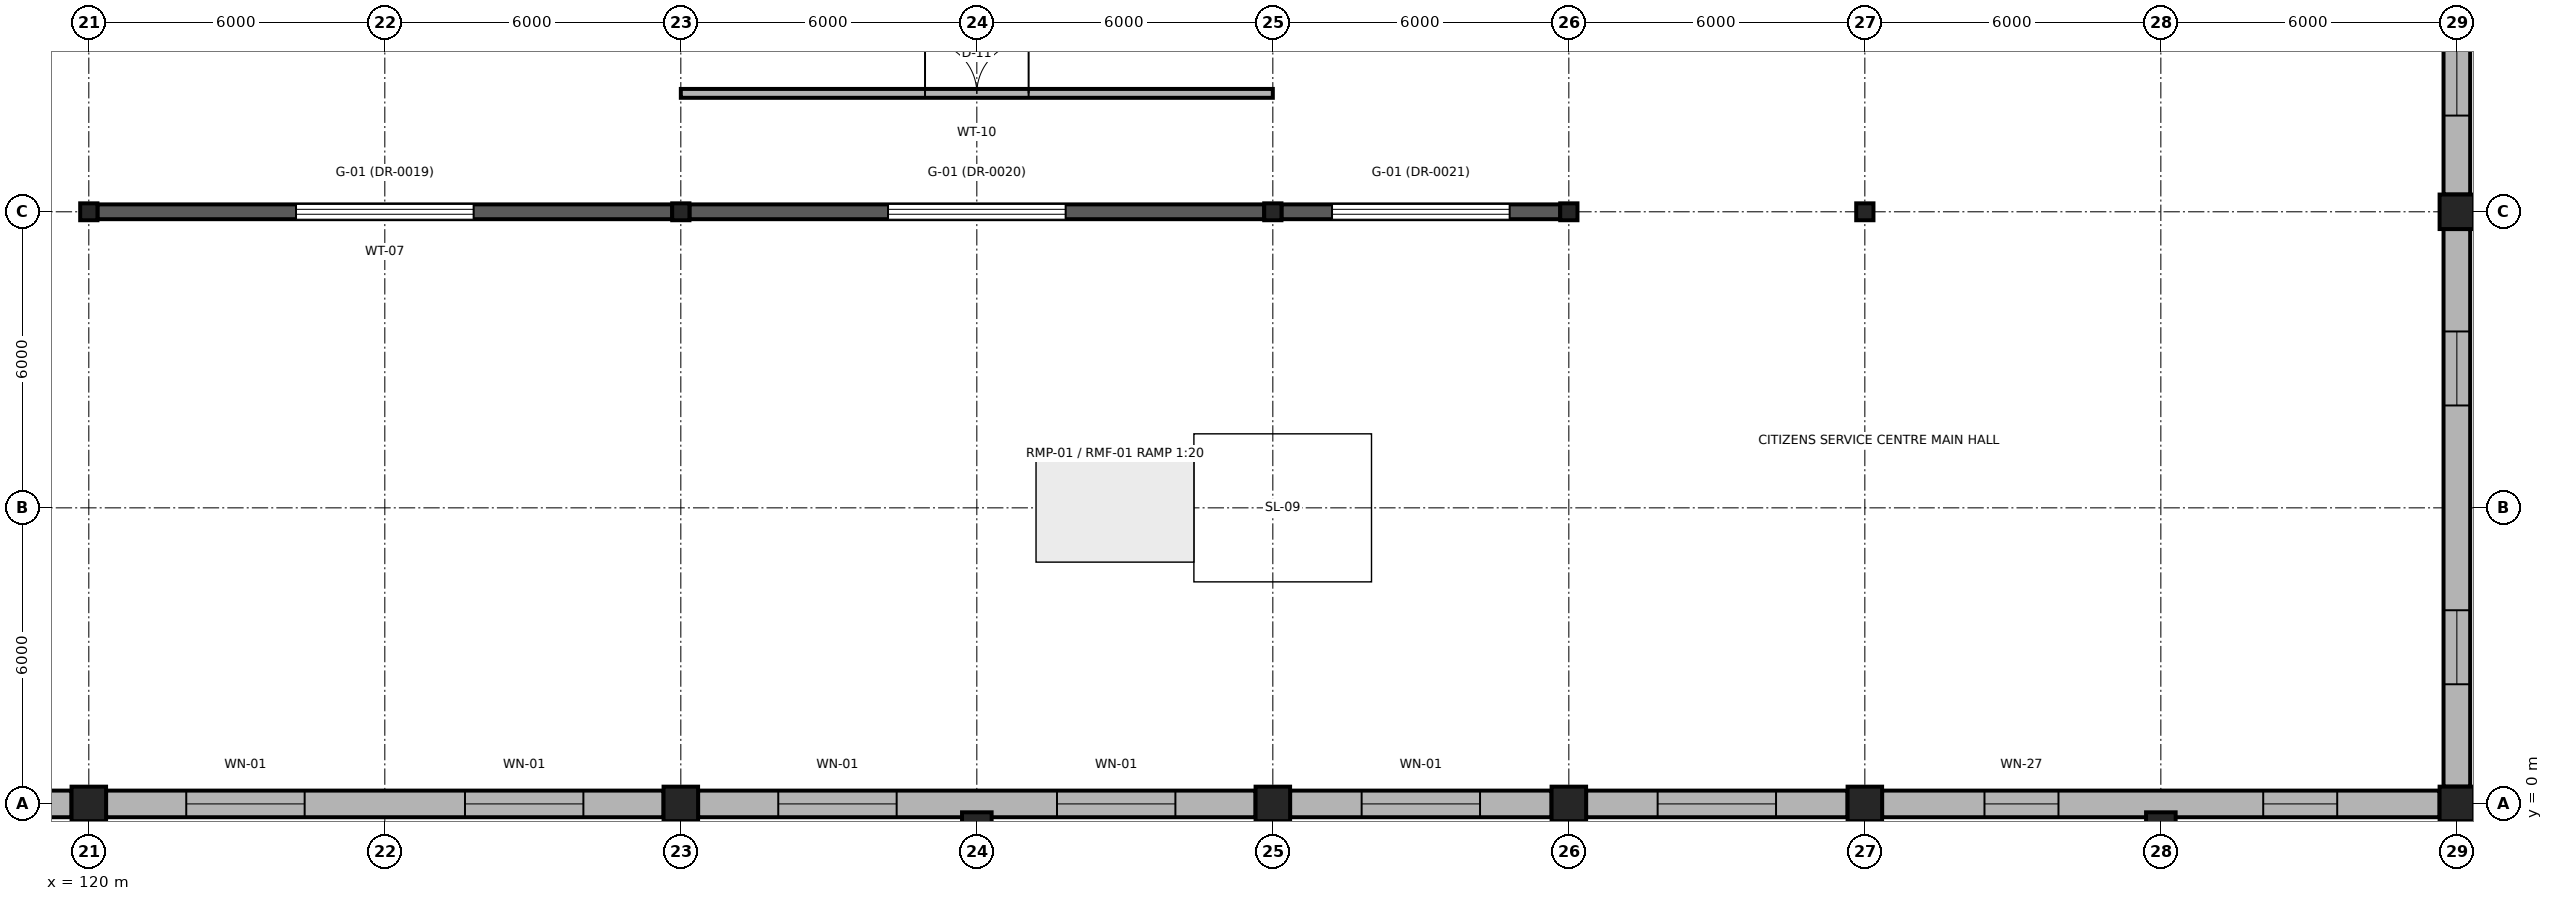
"""IFC4 building model, lengths in metres.
Left out: names, types, materials, properties, quantities, classifications, styles, units other than length and angle.
Written with IfcOpenShell. Run it as: python <this file> out.ifc"""

import sys

from ifc_helpers import new_model, si_unit, direction, frame, frame_2d, origin, origin_2d, place, context, subcontext, project, spatial, rectangle, i_section, extrude, element, fill, save


model = new_model("IFC4")
c1 = context("Model", 3, precision=1e-05, world=origin(), true_north=direction((0.0, 1.0)))
c2 = subcontext(c1, "Body", "Model", "MODEL_VIEW")
j1 = project(units=[si_unit("LENGTHUNIT", "METRE"), si_unit("PLANEANGLEUNIT", "RADIAN")], contexts=[c1])
p1 = place(None, origin())
s1 = spatial("IfcSite", under=j1, at=p1, CompositionType="ELEMENT")
p2 = place(p1, origin())
s2 = spatial("IfcBuilding", under=s1, at=p2, CompositionType="ELEMENT")
p3 = place(p2, origin())
s3 = spatial("IfcBuildingStorey", under=s2, at=p3, CompositionType="ELEMENT", Elevation=0.0)
for number, where, z_axis, x_axis in (
    (1, (120.0, 0.0, 0.0), (0.0, 0.0, 1.0), (1.0, 0.0, 0.0)),
    (2, (132.0, 0.0, 0.0), (0.0, 0.0, 1.0), (1.0, 0.0, 0.0)),
    (3, (144.0, 0.0, 0.0), (0.0, 0.0, 1.0), (1.0, 0.0, 0.0)),
    (4, (150.0, 0.0, 0.0), (0.0, 0.0, 1.0), (1.0, 0.0, 0.0)),
    (5, (156.0, 0.0, 0.0), (0.0, 0.0, 1.0), (1.0, 0.0, 0.0)),
    (6, (168.0, 0.0, 0.0), (0.0, 0.0, 1.0), (1.0, 0.0, 0.0)),
):
    element("IfcColumn", number, at=place(p3, frame(where, z_axis=z_axis, x_axis=x_axis)), inside=s3, PredefinedType="COLUMN", context=c2, shape_type="SweptSolid", body=[
        extrude(rectangle(XDim=0.7, YDim=0.7, at=origin_2d()), origin(), (0.0, 0.0, 1.0), 6.0),
    ])
for number, where, z_axis, x_axis in (
    (7, (120.0, 12.0, 0.0), (0.0, 0.0, 1.0), (1.0, 0.0, 0.0)),
    (8, (132.0, 12.0, 0.0), (0.0, 0.0, 1.0), (1.0, 0.0, 0.0)),
    (9, (144.0, 12.0, 0.0), (0.0, 0.0, 1.0), (1.0, 0.0, 0.0)),
    (10, (150.0, 12.0, 0.0), (0.0, 0.0, 1.0), (1.0, 0.0, 0.0)),
    (11, (156.0, 12.0, 0.0), (0.0, 0.0, 1.0), (1.0, 0.0, 0.0)),
):
    element("IfcColumn", number, at=place(p3, frame(where, z_axis=z_axis, x_axis=x_axis)), inside=s3, PredefinedType="COLUMN", context=c2, shape_type="SweptSolid", body=[
        extrude(i_section(OverallWidth=0.35, OverallDepth=0.343, WebThickness=0.01, FlangeThickness=0.015, FilletRadius=0.02, at=origin_2d()), origin(), (0.0, 0.0, 1.0), 6.0),
    ])
p4 = place(p3, frame((168.0, 12.0, 0.0), z_axis=(0.0, 0.0, 1.0), x_axis=(1.0, 0.0, 0.0)))
e12 = element("IfcColumn", 12, at=p4, inside=s3, PredefinedType="COLUMN", context=c2, shape_type="SweptSolid", body=[
    extrude(rectangle(XDim=0.7, YDim=0.7, at=origin_2d()), origin(), (0.0, 0.0, 1.0), 6.0),
])
for number, where, z_axis, x_axis in (
    (13, (138.0, -0.35, 0.0), (0.0, 0.0, 1.0), (1.0, 0.0, 0.0)),
    (14, (162.0, -0.35, 0.0), (0.0, 0.0, 1.0), (1.0, 0.0, 0.0)),
):
    element("IfcColumn", number, at=place(p3, frame(where, z_axis=z_axis, x_axis=x_axis)), inside=s3, PredefinedType="PILASTER", context=c2, shape_type="SweptSolid", body=[
        extrude(rectangle(XDim=0.6, YDim=0.36, at=origin_2d()), origin(), (0.0, 0.0, 1.0), 6.0),
    ])
p5 = place(p3, frame((114.35, 0.0, 0.0), z_axis=(0.0, 0.0, 1.0), x_axis=(1.0, 0.0, 0.0)))
e15 = element("IfcWall", 15, at=p5, inside=s3, PredefinedType="SOLIDWALL", context=c2, shape_type="SweptSolid", body=[
    extrude(rectangle(XDim=5.3, YDim=0.54, at=frame_2d((2.65, 0.0))), origin(), (0.0, 0.0, 1.0), 5.31),
])
p6 = place(p5, frame((1.45, 0.0, 0.85)))
e16 = element("IfcOpeningElement", 16, at=p6, cuts=e15, PredefinedType="OPENING", context=c2, shape_type="SweptSolid", body=[
    extrude(rectangle(XDim=2.4, YDim=3.6, at=frame_2d((1.2, 1.8))), frame((0.0, 0.285, 0.0), z_axis=(0.0, -1.0, 0.0), x_axis=(1.0, 0.0, 0.0)), (0.0, 0.0, 1.0), 0.57),
])
p7 = place(p3, frame((120.35, 0.0, 0.0), z_axis=(0.0, 0.0, 1.0), x_axis=(1.0, 0.0, 0.0)))
e17 = element("IfcWall", 17, at=p7, inside=s3, PredefinedType="SOLIDWALL", context=c2, shape_type="SweptSolid", body=[
    extrude(rectangle(XDim=11.3, YDim=0.54, at=frame_2d((5.65, 0.0))), origin(), (0.0, 0.0, 1.0), 5.31),
])
p8 = place(p7, frame((1.625, 0.0, 0.85)))
e18 = element("IfcOpeningElement", 18, at=p8, cuts=e17, PredefinedType="OPENING", context=c2, shape_type="SweptSolid", body=[
    extrude(rectangle(XDim=2.4, YDim=3.6, at=frame_2d((1.2, 1.8))), frame((0.0, 0.285, 0.0), z_axis=(0.0, -1.0, 0.0), x_axis=(1.0, 0.0, 0.0)), (0.0, 0.0, 1.0), 0.57),
])
p9 = place(p7, frame((7.275, 0.0, 0.85)))
e19 = element("IfcOpeningElement", 19, at=p9, cuts=e17, PredefinedType="OPENING", context=c2, shape_type="SweptSolid", body=[
    extrude(rectangle(XDim=2.4, YDim=3.6, at=frame_2d((1.2, 1.8))), frame((0.0, 0.285, 0.0), z_axis=(0.0, -1.0, 0.0), x_axis=(1.0, 0.0, 0.0)), (0.0, 0.0, 1.0), 0.57),
])
p10 = place(p3, frame((132.35, 0.0, 0.0), z_axis=(0.0, 0.0, 1.0), x_axis=(1.0, 0.0, 0.0)))
e20 = element("IfcWall", 20, at=p10, inside=s3, PredefinedType="SOLIDWALL", context=c2, shape_type="SweptSolid", body=[
    extrude(rectangle(XDim=11.3, YDim=0.54, at=frame_2d((5.65, 0.0))), origin(), (0.0, 0.0, 1.0), 5.31),
])
p11 = place(p10, frame((1.625, 0.0, 0.85)))
e21 = element("IfcOpeningElement", 21, at=p11, cuts=e20, PredefinedType="OPENING", context=c2, shape_type="SweptSolid", body=[
    extrude(rectangle(XDim=2.4, YDim=3.6, at=frame_2d((1.2, 1.8))), frame((0.0, 0.285, 0.0), z_axis=(0.0, -1.0, 0.0), x_axis=(1.0, 0.0, 0.0)), (0.0, 0.0, 1.0), 0.57),
])
p12 = place(p10, frame((7.275, 0.0, 0.85)))
e22 = element("IfcOpeningElement", 22, at=p12, cuts=e20, PredefinedType="OPENING", context=c2, shape_type="SweptSolid", body=[
    extrude(rectangle(XDim=2.4, YDim=3.6, at=frame_2d((1.2, 1.8))), frame((0.0, 0.285, 0.0), z_axis=(0.0, -1.0, 0.0), x_axis=(1.0, 0.0, 0.0)), (0.0, 0.0, 1.0), 0.57),
])
p13 = place(p3, frame((144.35, 0.0, 0.0), z_axis=(0.0, 0.0, 1.0), x_axis=(1.0, 0.0, 0.0)))
e23 = element("IfcWall", 23, at=p13, inside=s3, PredefinedType="SOLIDWALL", context=c2, shape_type="SweptSolid", body=[
    extrude(rectangle(XDim=5.3, YDim=0.54, at=frame_2d((2.65, 0.0))), origin(), (0.0, 0.0, 1.0), 5.31),
])
p14 = place(p13, frame((1.45, 0.0, 0.85)))
e24 = element("IfcOpeningElement", 24, at=p14, cuts=e23, PredefinedType="OPENING", context=c2, shape_type="SweptSolid", body=[
    extrude(rectangle(XDim=2.4, YDim=3.6, at=frame_2d((1.2, 1.8))), frame((0.0, 0.285, 0.0), z_axis=(0.0, -1.0, 0.0), x_axis=(1.0, 0.0, 0.0)), (0.0, 0.0, 1.0), 0.57),
])
p15 = place(p3, frame((150.35, 0.0, 0.0), z_axis=(0.0, 0.0, 1.0), x_axis=(1.0, 0.0, 0.0)))
e25 = element("IfcWall", 25, at=p15, inside=s3, PredefinedType="SOLIDWALL", context=c2, shape_type="SweptSolid", body=[
    extrude(rectangle(XDim=5.3, YDim=0.54, at=frame_2d((2.65, 0.0))), origin(), (0.0, 0.0, 1.0), 5.31),
])
p16 = place(p15, frame((1.45, 0.0, 0.85)))
e26 = element("IfcOpeningElement", 26, at=p16, cuts=e25, PredefinedType="OPENING", context=c2, shape_type="SweptSolid", body=[
    extrude(rectangle(XDim=2.4, YDim=3.6, at=frame_2d((1.2, 1.8))), frame((0.0, 0.285, 0.0), z_axis=(0.0, -1.0, 0.0), x_axis=(1.0, 0.0, 0.0)), (0.0, 0.0, 1.0), 0.57),
])
p17 = place(p3, frame((156.35, 0.0, 0.0), z_axis=(0.0, 0.0, 1.0), x_axis=(1.0, 0.0, 0.0)))
e27 = element("IfcWall", 27, at=p17, inside=s3, PredefinedType="SOLIDWALL", context=c2, shape_type="SweptSolid", body=[
    extrude(rectangle(XDim=11.3, YDim=0.54, at=frame_2d((5.65, 0.0))), origin(), (0.0, 0.0, 1.0), 5.31),
])
p18 = place(p17, frame((2.075, 0.0, 0.85)))
e28 = element("IfcOpeningElement", 28, at=p18, cuts=e27, PredefinedType="OPENING", context=c2, shape_type="SweptSolid", body=[
    extrude(rectangle(XDim=1.5, YDim=2.8, at=frame_2d((0.75, 1.4))), frame((0.0, 0.285, 0.0), z_axis=(0.0, -1.0, 0.0), x_axis=(1.0, 0.0, 0.0)), (0.0, 0.0, 1.0), 0.57),
])
p19 = place(p17, frame((7.725, 0.0, 0.85)))
e29 = element("IfcOpeningElement", 29, at=p19, cuts=e27, PredefinedType="OPENING", context=c2, shape_type="SweptSolid", body=[
    extrude(rectangle(XDim=1.5, YDim=2.8, at=frame_2d((0.75, 1.4))), frame((0.0, 0.285, 0.0), z_axis=(0.0, -1.0, 0.0), x_axis=(1.0, 0.0, 0.0)), (0.0, 0.0, 1.0), 0.57),
])
p20 = place(p3, frame((120.175, 12.0, 0.0), z_axis=(0.0, 0.0, 1.0), x_axis=(1.0, 0.0, 0.0)))
e30 = element("IfcWall", 30, at=p20, inside=s3, PredefinedType="SHEAR", context=c2, shape_type="SweptSolid", body=[
    extrude(rectangle(XDim=11.65, YDim=0.3, at=frame_2d((5.825, 0.0))), origin(), (0.0, 0.0, 1.0), 5.31),
])
p21 = place(p20, frame((4.025, 0.0, 0.0)))
e31 = element("IfcOpeningElement", 31, at=p21, cuts=e30, PredefinedType="OPENING", context=c2, shape_type="SweptSolid", body=[
    extrude(rectangle(XDim=3.6, YDim=3.4, at=frame_2d((1.8, 1.7))), frame((0.0, 0.165, 0.0), z_axis=(0.0, -1.0, 0.0), x_axis=(1.0, 0.0, 0.0)), (0.0, 0.0, 1.0), 0.33),
])
p22 = place(p3, frame((132.175, 12.0, 0.0), z_axis=(0.0, 0.0, 1.0), x_axis=(1.0, 0.0, 0.0)))
e32 = element("IfcWall", 32, at=p22, inside=s3, PredefinedType="SHEAR", context=c2, shape_type="SweptSolid", body=[
    extrude(rectangle(XDim=11.65, YDim=0.3, at=frame_2d((5.825, 0.0))), origin(), (0.0, 0.0, 1.0), 5.31),
])
p23 = place(p22, frame((4.025, 0.0, 0.0)))
e33 = element("IfcOpeningElement", 33, at=p23, cuts=e32, PredefinedType="OPENING", context=c2, shape_type="SweptSolid", body=[
    extrude(rectangle(XDim=3.6, YDim=3.4, at=frame_2d((1.8, 1.7))), frame((0.0, 0.165, 0.0), z_axis=(0.0, -1.0, 0.0), x_axis=(1.0, 0.0, 0.0)), (0.0, 0.0, 1.0), 0.33),
])
p24 = place(p3, frame((144.175, 12.0, 0.0), z_axis=(0.0, 0.0, 1.0), x_axis=(1.0, 0.0, 0.0)))
e34 = element("IfcWall", 34, at=p24, inside=s3, PredefinedType="SHEAR", context=c2, shape_type="SweptSolid", body=[
    extrude(rectangle(XDim=5.65, YDim=0.3, at=frame_2d((2.825, 0.0))), origin(), (0.0, 0.0, 1.0), 5.31),
])
p25 = place(p24, frame((1.025, 0.0, 0.0)))
e35 = element("IfcOpeningElement", 35, at=p25, cuts=e34, PredefinedType="OPENING", context=c2, shape_type="SweptSolid", body=[
    extrude(rectangle(XDim=3.6, YDim=3.4, at=frame_2d((1.8, 1.7))), frame((0.0, 0.165, 0.0), z_axis=(0.0, -1.0, 0.0), x_axis=(1.0, 0.0, 0.0)), (0.0, 0.0, 1.0), 0.33),
])
p26 = place(p3, frame((168.0, 0.35, 0.0), z_axis=(0.0, 0.0, 1.0), x_axis=(0.0, 1.0, 0.0)))
e36 = element("IfcWall", 36, at=p26, inside=s3, PredefinedType="SOLIDWALL", context=c2, shape_type="SweptSolid", body=[
    extrude(rectangle(XDim=11.3, YDim=0.54, at=frame_2d((5.65, 0.0))), origin(), (0.0, 0.0, 1.0), 5.31),
])
p27 = place(p26, frame((2.075, 0.0, 0.85)))
e37 = element("IfcOpeningElement", 37, at=p27, cuts=e36, PredefinedType="OPENING", context=c2, shape_type="SweptSolid", body=[
    extrude(rectangle(XDim=1.5, YDim=2.8, at=frame_2d((0.75, 1.4))), frame((0.0, 0.285, 0.0), z_axis=(0.0, -1.0, 0.0), x_axis=(1.0, 0.0, 0.0)), (0.0, 0.0, 1.0), 0.57),
])
p28 = place(p26, frame((7.725, 0.0, 0.85)))
e38 = element("IfcOpeningElement", 38, at=p28, cuts=e36, PredefinedType="OPENING", context=c2, shape_type="SweptSolid", body=[
    extrude(rectangle(XDim=1.5, YDim=2.8, at=frame_2d((0.75, 1.4))), frame((0.0, 0.285, 0.0), z_axis=(0.0, -1.0, 0.0), x_axis=(1.0, 0.0, 0.0)), (0.0, 0.0, 1.0), 0.57),
])
p29 = place(p3, frame((168.0, 12.35, 0.0), z_axis=(0.0, 0.0, 1.0), x_axis=(0.0, 1.0, 0.0)))
e39 = element("IfcWall", 39, at=p29, inside=s3, PredefinedType="SOLIDWALL", context=c2, shape_type="SweptSolid", body=[
    extrude(rectangle(XDim=5.3, YDim=0.54, at=frame_2d((2.65, 0.0))), origin(), (0.0, 0.0, 1.0), 5.31),
])
p30 = place(p29, frame((1.6, 0.0, 0.85)))
e40 = element("IfcOpeningElement", 40, at=p30, cuts=e39, PredefinedType="OPENING", context=c2, shape_type="SweptSolid", body=[
    extrude(rectangle(XDim=2.1, YDim=3.4, at=frame_2d((1.05, 1.7))), frame((0.0, 0.285, 0.0), z_axis=(0.0, -1.0, 0.0), x_axis=(1.0, 0.0, 0.0)), (0.0, 0.0, 1.0), 0.57),
])
p31 = place(p3, frame((132.0, 14.4, 0.0), z_axis=(0.0, 0.0, 1.0), x_axis=(1.0, 0.0, 0.0)))
e41 = element("IfcWall", 41, at=p31, inside=s3, PredefinedType="PARTITIONING", context=c2, shape_type="SweptSolid", body=[
    extrude(rectangle(XDim=12.0, YDim=0.18, at=frame_2d((6.0, 0.0))), origin(), (0.0, 0.0, 1.0), 5.76),
])
p32 = place(p31, frame((4.95, 0.0, 0.0)))
e42 = element("IfcOpeningElement", 42, at=p32, cuts=e41, PredefinedType="OPENING", context=c2, shape_type="SweptSolid", body=[
    extrude(rectangle(XDim=2.1, YDim=2.9, at=frame_2d((1.05, 1.45))), frame((0.0, 0.105, 0.0), z_axis=(0.0, -1.0, 0.0), x_axis=(1.0, 0.0, 0.0)), (0.0, 0.0, 1.0), 0.21),
])
p33 = place(p8, origin())
e43 = element("IfcWindow", 43, at=p33, inside=s3, PartitioningType="SINGLE_PANEL", PredefinedType="WINDOW", context=c2, shape_type="SweptSolid", body=[
    extrude(rectangle(XDim=2.4, YDim=3.6, at=frame_2d((1.2, 1.8))), frame((0.0, 0.03, 0.0), z_axis=(0.0, -1.0, 0.0), x_axis=(1.0, 0.0, 0.0)), (0.0, 0.0, 1.0), 0.06),
])
fill(e18, e43)
p34 = place(p9, origin())
e44 = element("IfcWindow", 44, at=p34, inside=s3, PartitioningType="SINGLE_PANEL", PredefinedType="WINDOW", context=c2, shape_type="SweptSolid", body=[
    extrude(rectangle(XDim=2.4, YDim=3.6, at=frame_2d((1.2, 1.8))), frame((0.0, 0.03, 0.0), z_axis=(0.0, -1.0, 0.0), x_axis=(1.0, 0.0, 0.0)), (0.0, 0.0, 1.0), 0.06),
])
fill(e19, e44)
p35 = place(p11, origin())
e45 = element("IfcWindow", 45, at=p35, inside=s3, PartitioningType="SINGLE_PANEL", PredefinedType="WINDOW", context=c2, shape_type="SweptSolid", body=[
    extrude(rectangle(XDim=2.4, YDim=3.6, at=frame_2d((1.2, 1.8))), frame((0.0, 0.03, 0.0), z_axis=(0.0, -1.0, 0.0), x_axis=(1.0, 0.0, 0.0)), (0.0, 0.0, 1.0), 0.06),
])
fill(e21, e45)
p36 = place(p12, origin())
e46 = element("IfcWindow", 46, at=p36, inside=s3, PartitioningType="SINGLE_PANEL", PredefinedType="WINDOW", context=c2, shape_type="SweptSolid", body=[
    extrude(rectangle(XDim=2.4, YDim=3.6, at=frame_2d((1.2, 1.8))), frame((0.0, 0.03, 0.0), z_axis=(0.0, -1.0, 0.0), x_axis=(1.0, 0.0, 0.0)), (0.0, 0.0, 1.0), 0.06),
])
fill(e22, e46)
p37 = place(p14, origin())
e47 = element("IfcWindow", 47, at=p37, inside=s3, PartitioningType="SINGLE_PANEL", PredefinedType="WINDOW", context=c2, shape_type="SweptSolid", body=[
    extrude(rectangle(XDim=2.4, YDim=3.6, at=frame_2d((1.2, 1.8))), frame((0.0, 0.03, 0.0), z_axis=(0.0, -1.0, 0.0), x_axis=(1.0, 0.0, 0.0)), (0.0, 0.0, 1.0), 0.06),
])
fill(e24, e47)
p38 = place(p16, origin())
e48 = element("IfcWindow", 48, at=p38, inside=s3, PartitioningType="SINGLE_PANEL", PredefinedType="WINDOW", context=c2, shape_type="SweptSolid", body=[
    extrude(rectangle(XDim=2.4, YDim=3.6, at=frame_2d((1.2, 1.8))), frame((0.0, 0.03, 0.0), z_axis=(0.0, -1.0, 0.0), x_axis=(1.0, 0.0, 0.0)), (0.0, 0.0, 1.0), 0.06),
])
fill(e26, e48)
p39 = place(p18, origin())
e49 = element("IfcWindow", 49, at=p39, inside=s3, PartitioningType="SINGLE_PANEL", PredefinedType="WINDOW", context=c2, shape_type="SweptSolid", body=[
    extrude(rectangle(XDim=1.5, YDim=2.8, at=frame_2d((0.75, 1.4))), frame((0.0, 0.03, 0.0), z_axis=(0.0, -1.0, 0.0), x_axis=(1.0, 0.0, 0.0)), (0.0, 0.0, 1.0), 0.06),
])
fill(e28, e49)
p40 = place(p19, origin())
e50 = element("IfcWindow", 50, at=p40, inside=s3, PartitioningType="SINGLE_PANEL", PredefinedType="WINDOW", context=c2, shape_type="SweptSolid", body=[
    extrude(rectangle(XDim=1.5, YDim=2.8, at=frame_2d((0.75, 1.4))), frame((0.0, 0.03, 0.0), z_axis=(0.0, -1.0, 0.0), x_axis=(1.0, 0.0, 0.0)), (0.0, 0.0, 1.0), 0.06),
])
fill(e29, e50)
p41 = place(p21, origin())
e51 = element("IfcDoor", 51, at=p41, inside=s3, OperationType="ROLLINGUP", PredefinedType="GATE", context=c2, shape_type="SweptSolid", body=[
    extrude(rectangle(XDim=3.6, YDim=3.4, at=frame_2d((1.8, 1.7))), frame((0.0, 0.025, 0.0), z_axis=(0.0, -1.0, 0.0), x_axis=(1.0, 0.0, 0.0)), (0.0, 0.0, 1.0), 0.05),
])
fill(e31, e51)
p42 = place(p23, origin())
e52 = element("IfcDoor", 52, at=p42, inside=s3, OperationType="ROLLINGUP", PredefinedType="GATE", context=c2, shape_type="SweptSolid", body=[
    extrude(rectangle(XDim=3.6, YDim=3.4, at=frame_2d((1.8, 1.7))), frame((0.0, 0.025, 0.0), z_axis=(0.0, -1.0, 0.0), x_axis=(1.0, 0.0, 0.0)), (0.0, 0.0, 1.0), 0.05),
])
fill(e33, e52)
p43 = place(p25, origin())
e53 = element("IfcDoor", 53, at=p43, inside=s3, OperationType="ROLLINGUP", PredefinedType="GATE", context=c2, shape_type="SweptSolid", body=[
    extrude(rectangle(XDim=3.6, YDim=3.4, at=frame_2d((1.8, 1.7))), frame((0.0, 0.025, 0.0), z_axis=(0.0, -1.0, 0.0), x_axis=(1.0, 0.0, 0.0)), (0.0, 0.0, 1.0), 0.05),
])
fill(e35, e53)
p44 = place(p27, origin())
e54 = element("IfcWindow", 54, at=p44, inside=s3, PartitioningType="SINGLE_PANEL", PredefinedType="WINDOW", context=c2, shape_type="SweptSolid", body=[
    extrude(rectangle(XDim=1.5, YDim=2.8, at=frame_2d((0.75, 1.4))), frame((0.0, 0.03, 0.0), z_axis=(0.0, -1.0, 0.0), x_axis=(1.0, 0.0, 0.0)), (0.0, 0.0, 1.0), 0.06),
])
fill(e37, e54)
p45 = place(p28, origin())
e55 = element("IfcWindow", 55, at=p45, inside=s3, PartitioningType="SINGLE_PANEL", PredefinedType="WINDOW", context=c2, shape_type="SweptSolid", body=[
    extrude(rectangle(XDim=1.5, YDim=2.8, at=frame_2d((0.75, 1.4))), frame((0.0, 0.03, 0.0), z_axis=(0.0, -1.0, 0.0), x_axis=(1.0, 0.0, 0.0)), (0.0, 0.0, 1.0), 0.06),
])
fill(e38, e55)
p46 = place(p30, origin())
e56 = element("IfcWindow", 56, at=p46, inside=s3, PartitioningType="SINGLE_PANEL", PredefinedType="WINDOW", context=c2, shape_type="SweptSolid", body=[
    extrude(rectangle(XDim=2.1, YDim=3.4, at=frame_2d((1.05, 1.7))), frame((0.0, 0.03, 0.0), z_axis=(0.0, -1.0, 0.0), x_axis=(1.0, 0.0, 0.0)), (0.0, 0.0, 1.0), 0.06),
])
fill(e40, e56)
p47 = place(p32, origin())
e57 = element("IfcDoor", 57, at=p47, inside=s3, OperationType="DOUBLE_DOOR_SINGLE_SWING", PredefinedType="DOOR", context=c2, shape_type="SweptSolid", body=[
    extrude(rectangle(XDim=2.1, YDim=2.9, at=frame_2d((1.05, 1.45))), frame((0.0, 0.025, 0.0), z_axis=(0.0, -1.0, 0.0), x_axis=(1.0, 0.0, 0.0)), (0.0, 0.0, 1.0), 0.05),
])
fill(e42, e57)
save(model, sys.argv[1])
